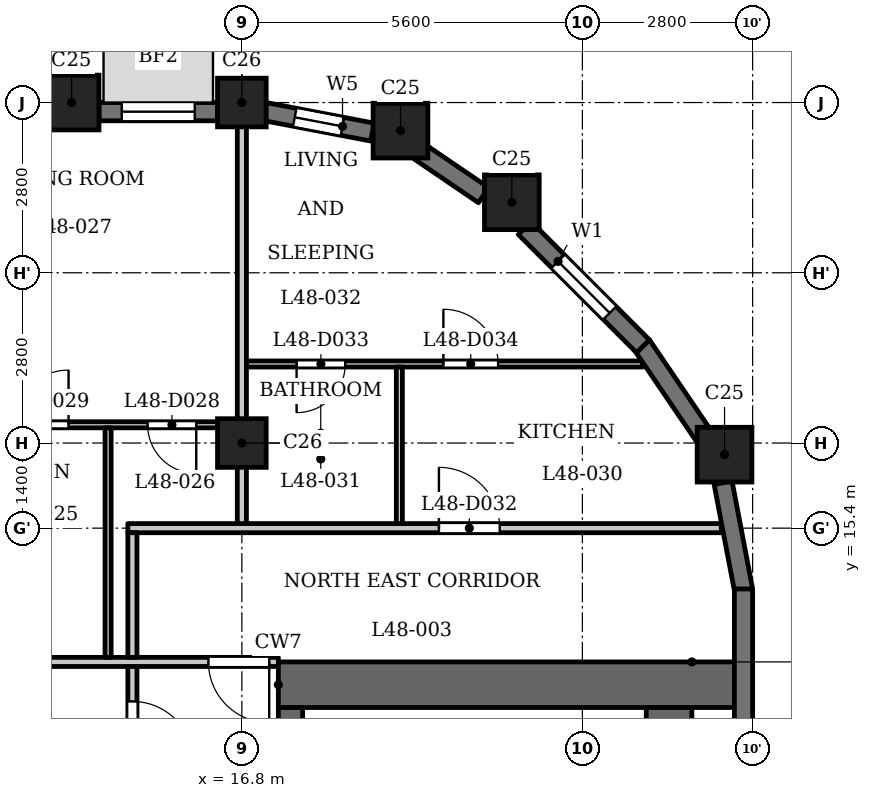
"""IFC4 building model, lengths in metres.
Left out: names, types, materials, properties, quantities, classifications, styles, units other than length and angle.
Written with IfcOpenShell. Run it as: python <this file> out.ifc"""

import sys

from ifc_helpers import new_model, si_unit, direction, frame, frame_2d, origin, origin_2d, place, context, subcontext, project, spatial, rectangle, extrude, element, fill, save


model = new_model("IFC4")
c1 = context("Model", 3, precision=1e-05, world=origin(), true_north=direction((0.0, 1.0)))
c2 = subcontext(c1, "Body", "Model", "MODEL_VIEW")
j1 = project(units=[si_unit("LENGTHUNIT", "METRE"), si_unit("PLANEANGLEUNIT", "RADIAN")], contexts=[c1])
p1 = place(None, origin())
s1 = spatial("IfcSite", under=j1, at=p1, CompositionType="ELEMENT")
p2 = place(p1, origin())
s2 = spatial("IfcBuilding", under=s1, at=p2, CompositionType="ELEMENT")
p3 = place(p2, frame((0.0, 0.0, 188.9)))
s3 = spatial("IfcBuildingStorey", under=s2, at=p3, CompositionType="ELEMENT", Elevation=188.9)
for number, where, z_axis, x_axis in (
    (1, (24.738, 16.609, 0.0), (0.0, 0.0, 1.0), (1.0, 0.0, 0.0)),
    (2, (21.24, 20.76, 0.0), (0.0, 0.0, 1.0), (1.0, 0.0, 0.0)),
    (3, (19.409, 21.938, 0.0), (0.0, 0.0, 1.0), (1.0, 0.0, 0.0)),
    (4, (14.0, 22.4, 0.0), (0.0, 0.0, 1.0), (1.0, 0.0, 0.0)),
):
    element("IfcColumn", number, at=place(p3, frame(where, z_axis=z_axis, x_axis=x_axis)), inside=s3, PredefinedType="COLUMN", context=c2, shape_type="SweptSolid", body=[
        extrude(rectangle(XDim=0.9, YDim=0.9, at=origin_2d()), origin(), (0.0, 0.0, 1.0), 3.5),
    ])
for number, where, z_axis, x_axis in (
    (5, (16.8, 16.8, 0.0), (0.0, 0.0, 1.0), (1.0, 0.0, 0.0)),
    (6, (16.8, 22.4, 0.0), (0.0, 0.0, 1.0), (1.0, 0.0, 0.0)),
):
    element("IfcColumn", number, at=place(p3, frame(where, z_axis=z_axis, x_axis=x_axis)), inside=s3, PredefinedType="COLUMN", context=c2, shape_type="SweptSolid", body=[
        extrude(rectangle(XDim=0.8, YDim=0.8, at=origin_2d()), origin(), (0.0, 0.0, 1.0), 3.5),
    ])
p4 = place(p3, frame((25.05, 11.65, 0.0), z_axis=(0.0, 0.0, 1.0), x_axis=(0.0, 1.0, 0.0)))
e7 = element("IfcWall", 7, at=p4, inside=s3, PredefinedType="SOLIDWALL", context=c2, shape_type="SweptSolid", body=[
    extrude(rectangle(XDim=2.75, YDim=0.3, at=frame_2d((1.375, 0.0))), origin(), (0.0, 0.0, 1.0), 2.5),
])
for number, where, z_axis, x_axis in (
    (8, (25.053, 14.372, 0.0), (0.0, 0.0, 1.0), (-0.187, 0.982, 0.0)),
    (9, (24.394, 16.919, 0.0), (0.0, 0.0, 1.0), (-0.562, 0.827, 0.0)),
):
    element("IfcWall", number, at=place(p3, frame(where, z_axis=z_axis, x_axis=x_axis)), inside=s3, PredefinedType="SOLIDWALL", context=c2, shape_type="SweptSolid", body=[
        extrude(rectangle(XDim=1.806, YDim=0.3, at=frame_2d((0.903, 0.0))), origin(), (0.0, 0.0, 1.0), 2.5),
    ])
p5 = place(p3, frame((23.397, 18.391, 0.0), z_axis=(0.0, 0.0, 1.0), x_axis=(-0.707106781187, 0.707106781187, 0.0)))
e10 = element("IfcWall", 10, at=p5, inside=s3, PredefinedType="SOLIDWALL", context=c2, shape_type="SweptSolid", body=[
    extrude(rectangle(XDim=2.75, YDim=0.3, at=frame_2d((1.375, 0.0))), origin(), (0.0, 0.0, 1.0), 2.5),
])
p6 = place(p5, frame((0.775, 0.0, 0.6)))
e11 = element("IfcOpeningElement", 11, at=p6, cuts=e10, PredefinedType="OPENING", context=c2, shape_type="SweptSolid", body=[
    extrude(rectangle(XDim=1.2, YDim=1.55, at=frame_2d((0.6, 0.775))), frame((0.0, 0.16, 0.0), z_axis=(0.0, -1.0, 0.0), x_axis=(1.0, 0.0, 0.0)), (0.0, 0.0, 1.0), 0.32),
])
p7 = place(p3, frame((20.775, 20.876, 0.0), z_axis=(0.0, 0.0, 1.0), x_axis=(-0.827075824828, 0.562090366388, 0.0)))
e12 = element("IfcWall", 12, at=p7, inside=s3, PredefinedType="SOLIDWALL", context=c2, shape_type="SweptSolid", body=[
    extrude(rectangle(XDim=1.277, YDim=0.3, at=frame_2d((0.638, 0.0))), origin(), (0.0, 0.0, 1.0), 2.5),
])
p8 = place(p3, frame((18.946, 21.914, 0.0), z_axis=(0.0, 0.0, 1.0), x_axis=(-0.98230529033, 0.187286722942, 0.0)))
e13 = element("IfcWall", 13, at=p8, inside=s3, PredefinedType="SOLIDWALL", context=c2, shape_type="SweptSolid", body=[
    extrude(rectangle(XDim=1.799, YDim=0.3, at=frame_2d((0.899, 0.0))), origin(), (0.0, 0.0, 1.0), 2.5),
])
p9 = place(p8, frame((0.5, 0.0, 0.6)))
e14 = element("IfcOpeningElement", 14, at=p9, cuts=e13, PredefinedType="OPENING", context=c2, shape_type="SweptSolid", body=[
    extrude(rectangle(XDim=0.8, YDim=1.55, at=frame_2d((0.4, 0.775))), frame((0.0, 0.16, 0.0), z_axis=(0.0, -1.0, 0.0), x_axis=(1.0, 0.0, 0.0)), (0.0, 0.0, 1.0), 0.32),
])
p10 = place(p3, frame((16.4, 22.25, 0.0), z_axis=(0.0, 0.0, 1.0), x_axis=(-1.0, 0.0, 0.0)))
e15 = element("IfcWall", 15, at=p10, inside=s3, PredefinedType="SOLIDWALL", context=c2, shape_type="SweptSolid", body=[
    extrude(rectangle(XDim=1.95, YDim=0.3, at=frame_2d((0.975, 0.0))), origin(), (0.0, 0.0, 1.0), 2.5),
])
p11 = place(p10, frame((0.375, 0.0, 0.6)))
e16 = element("IfcOpeningElement", 16, at=p11, cuts=e15, PredefinedType="OPENING", context=c2, shape_type="SweptSolid", body=[
    extrude(rectangle(XDim=1.2, YDim=1.55, at=frame_2d((0.6, 0.775))), frame((0.0, 0.16, 0.0), z_axis=(0.0, -1.0, 0.0), x_axis=(1.0, 0.0, 0.0)), (0.0, 0.0, 1.0), 0.32),
])
p12 = place(p3, frame((17.4, 12.825, 0.0), z_axis=(0.0, 0.0, 1.0), x_axis=(1.0, 0.0, 0.0)))
e17 = element("IfcWall", 17, at=p12, inside=s3, PredefinedType="SHEAR", context=c2, shape_type="SweptSolid", body=[
    extrude(rectangle(XDim=7.6, YDim=0.75, at=frame_2d((3.8, 0.0))), origin(), (0.0, 0.0, 1.0), 3.2),
])
p13 = place(p3, frame((17.6, -12.45, 0.0), z_axis=(0.0, 0.0, 1.0), x_axis=(0.0, 1.0, 0.0)))
e18 = element("IfcWall", 18, at=p13, inside=s3, PredefinedType="SHEAR", context=c2, shape_type="SweptSolid", body=[
    extrude(rectangle(XDim=24.9, YDim=0.4, at=frame_2d((12.45, 0.0))), origin(), (0.0, 0.0, 1.0), 3.2),
])
p14 = place(p13, frame((6.325, 0.0, 0.0)))
e19 = element("IfcOpeningElement", 19, at=p14, cuts=e18, PredefinedType="OPENING", context=c2, shape_type="SweptSolid", body=[
    extrude(rectangle(XDim=0.9, YDim=2.1, at=frame_2d((0.45, 1.05))), frame((0.0, 0.21, 0.0), z_axis=(0.0, -1.0, 0.0), x_axis=(1.0, 0.0, 0.0)), (0.0, 0.0, 1.0), 0.42),
])
p15 = place(p13, frame((9.925, 0.0, 0.0)))
e20 = element("IfcOpeningElement", 20, at=p15, cuts=e18, PredefinedType="OPENING", context=c2, shape_type="SweptSolid", body=[
    extrude(rectangle(XDim=0.9, YDim=2.1, at=frame_2d((0.45, 1.05))), frame((0.0, 0.21, 0.0), z_axis=(0.0, -1.0, 0.0), x_axis=(1.0, 0.0, 0.0)), (0.0, 0.0, 1.0), 0.42),
])
p16 = place(p13, frame((15.6, 0.0, 0.0)))
e21 = element("IfcOpeningElement", 21, at=p16, cuts=e18, PredefinedType="OPENING", context=c2, shape_type="SweptSolid", body=[
    extrude(rectangle(XDim=1.1, YDim=2.1, at=frame_2d((0.55, 1.05))), frame((0.0, 0.21, 0.0), z_axis=(0.0, -1.0, 0.0), x_axis=(1.0, 0.0, 0.0)), (0.0, 0.0, 1.0), 0.42),
])
p17 = place(p13, frame((18.0, 0.0, 0.0)))
e22 = element("IfcOpeningElement", 22, at=p17, cuts=e18, PredefinedType="OPENING", context=c2, shape_type="SweptSolid", body=[
    extrude(rectangle(XDim=1.1, YDim=2.1, at=frame_2d((0.55, 1.05))), frame((0.0, 0.21, 0.0), z_axis=(0.0, -1.0, 0.0), x_axis=(1.0, 0.0, 0.0)), (0.0, 0.0, 1.0), 0.42),
])
p18 = place(p13, frame((23.025, 0.0, 0.0)))
e23 = element("IfcOpeningElement", 23, at=p18, cuts=e18, PredefinedType="OPENING", context=c2, shape_type="SweptSolid", body=[
    extrude(rectangle(XDim=1.1, YDim=2.1, at=frame_2d((0.55, 1.05))), frame((0.0, 0.21, 0.0), z_axis=(0.0, -1.0, 0.0), x_axis=(1.0, 0.0, 0.0)), (0.0, 0.0, 1.0), 0.42),
])
p19 = place(p13, frame((0.775, 0.0, 0.0)))
e24 = element("IfcOpeningElement", 24, at=p19, cuts=e18, PredefinedType="OPENING", context=c2, shape_type="SweptSolid", body=[
    extrude(rectangle(XDim=1.1, YDim=2.1, at=frame_2d((0.55, 1.05))), frame((0.0, 0.21, 0.0), z_axis=(0.0, -1.0, 0.0), x_axis=(1.0, 0.0, 0.0)), (0.0, 0.0, 1.0), 0.42),
])
p20 = place(p13, frame((12.925, 0.0, 0.0)))
e25 = element("IfcOpeningElement", 25, at=p20, cuts=e18, PredefinedType="OPENING", context=c2, shape_type="SweptSolid", body=[
    extrude(rectangle(XDim=1.8, YDim=2.1, at=frame_2d((0.9, 1.05))), frame((0.0, 0.21, 0.0), z_axis=(0.0, -1.0, 0.0), x_axis=(1.0, 0.0, 0.0)), (0.0, 0.0, 1.0), 0.42),
])
p21 = place(p3, frame((23.825, -12.45, 0.0), z_axis=(0.0, 0.0, 1.0), x_axis=(0.0, 1.0, 0.0)))
e26 = element("IfcWall", 26, at=p21, inside=s3, PredefinedType="SHEAR", context=c2, shape_type="SweptSolid", body=[
    extrude(rectangle(XDim=24.9, YDim=0.75, at=frame_2d((12.45, 0.0))), origin(), (0.0, 0.0, 1.0), 3.2),
])
p22 = place(p3, frame((-17.4, 13.2, 0.0), z_axis=(0.0, 0.0, 1.0), x_axis=(1.0, 0.0, 0.0)))
e27 = element("IfcWall", 27, at=p22, inside=s3, PredefinedType="PARTITIONING", context=c2, shape_type="SweptSolid", body=[
    extrude(rectangle(XDim=34.8, YDim=0.15, at=frame_2d((17.4, 0.0))), origin(), (0.0, 0.0, 1.0), 3.2),
])
p23 = place(p22, frame((0.25, 0.0, 0.0)))
e28 = element("IfcOpeningElement", 28, at=p23, cuts=e27, PredefinedType="OPENING", context=c2, shape_type="SweptSolid", body=[
    extrude(rectangle(XDim=1.0, YDim=2.1, at=frame_2d((0.5, 1.05))), frame((0.0, 0.085, 0.0), z_axis=(0.0, -1.0, 0.0), x_axis=(1.0, 0.0, 0.0)), (0.0, 0.0, 1.0), 0.17),
])
p24 = place(p22, frame((33.65, 0.0, 0.0)))
e29 = element("IfcOpeningElement", 29, at=p24, cuts=e27, PredefinedType="OPENING", context=c2, shape_type="SweptSolid", body=[
    extrude(rectangle(XDim=1.0, YDim=2.1, at=frame_2d((0.5, 1.05))), frame((0.0, 0.085, 0.0), z_axis=(0.0, -1.0, 0.0), x_axis=(1.0, 0.0, 0.0)), (0.0, 0.0, 1.0), 0.17),
])
p25 = place(p22, frame((10.15, 0.0, 0.0)))
e30 = element("IfcOpeningElement", 30, at=p25, cuts=e27, PredefinedType="OPENING", context=c2, shape_type="SweptSolid", body=[
    extrude(rectangle(XDim=1.0, YDim=2.1, at=frame_2d((0.5, 1.05))), frame((0.0, 0.085, 0.0), z_axis=(0.0, -1.0, 0.0), x_axis=(1.0, 0.0, 0.0)), (0.0, 0.0, 1.0), 0.17),
])
p26 = place(p22, frame((13.55, 0.0, 0.0)))
e31 = element("IfcOpeningElement", 31, at=p26, cuts=e27, PredefinedType="OPENING", context=c2, shape_type="SweptSolid", body=[
    extrude(rectangle(XDim=1.0, YDim=2.1, at=frame_2d((0.5, 1.05))), frame((0.0, 0.085, 0.0), z_axis=(0.0, -1.0, 0.0), x_axis=(1.0, 0.0, 0.0)), (0.0, 0.0, 1.0), 0.17),
])
p27 = place(p22, frame((20.85, 0.0, 0.0)))
e32 = element("IfcOpeningElement", 32, at=p27, cuts=e27, PredefinedType="OPENING", context=c2, shape_type="SweptSolid", body=[
    extrude(rectangle(XDim=1.0, YDim=2.1, at=frame_2d((0.5, 1.05))), frame((0.0, 0.085, 0.0), z_axis=(0.0, -1.0, 0.0), x_axis=(1.0, 0.0, 0.0)), (0.0, 0.0, 1.0), 0.17),
])
p28 = place(p22, frame((23.7, 0.0, 0.0)))
e33 = element("IfcOpeningElement", 33, at=p28, cuts=e27, PredefinedType="OPENING", context=c2, shape_type="SweptSolid", body=[
    extrude(rectangle(XDim=1.0, YDim=2.1, at=frame_2d((0.5, 1.05))), frame((0.0, 0.085, 0.0), z_axis=(0.0, -1.0, 0.0), x_axis=(1.0, 0.0, 0.0)), (0.0, 0.0, 1.0), 0.17),
])
p29 = place(p3, frame((14.925, 15.4, 0.0), z_axis=(0.0, 0.0, 1.0), x_axis=(1.0, 0.0, 0.0)))
e34 = element("IfcWall", 34, at=p29, inside=s3, PredefinedType="PARTITIONING", context=c2, shape_type="SweptSolid", body=[
    extrude(rectangle(XDim=9.759, YDim=0.15, at=frame_2d((4.879, 0.0))), origin(), (0.0, 0.0, 1.0), 3.2),
])
p30 = place(p29, frame((5.116, 0.0, 0.0)))
e35 = element("IfcOpeningElement", 35, at=p30, cuts=e34, PredefinedType="OPENING", context=c2, shape_type="SweptSolid", body=[
    extrude(rectangle(XDim=1.0, YDim=2.1, at=frame_2d((0.5, 1.05))), frame((0.0, 0.085, 0.0), z_axis=(0.0, -1.0, 0.0), x_axis=(1.0, 0.0, 0.0)), (0.0, 0.0, 1.0), 0.17),
])
p31 = place(p3, frame((-16.725, 17.1, 0.0), z_axis=(0.0, 0.0, 1.0), x_axis=(1.0, 0.0, 0.0)))
e36 = element("IfcWall", 36, at=p31, inside=s3, PredefinedType="PARTITIONING", context=c2, shape_type="SweptSolid", body=[
    extrude(rectangle(XDim=33.45, YDim=0.1, at=frame_2d((16.725, 0.0))), origin(), (0.0, 0.0, 1.0), 3.2),
])
p32 = place(p31, frame((4.075, 0.0, 0.0)))
e37 = element("IfcOpeningElement", 37, at=p32, cuts=e36, PredefinedType="OPENING", context=c2, shape_type="SweptSolid", body=[
    extrude(rectangle(XDim=0.8, YDim=2.1, at=frame_2d((0.4, 1.05))), frame((0.0, 0.06, 0.0), z_axis=(0.0, -1.0, 0.0), x_axis=(1.0, 0.0, 0.0)), (0.0, 0.0, 1.0), 0.12),
])
p33 = place(p31, frame((9.575, 0.0, 0.0)))
e38 = element("IfcOpeningElement", 38, at=p33, cuts=e36, PredefinedType="OPENING", context=c2, shape_type="SweptSolid", body=[
    extrude(rectangle(XDim=0.9, YDim=2.1, at=frame_2d((0.45, 1.05))), frame((0.0, 0.06, 0.0), z_axis=(0.0, -1.0, 0.0), x_axis=(1.0, 0.0, 0.0)), (0.0, 0.0, 1.0), 0.12),
])
p34 = place(p31, frame((15.175, 0.0, 0.0)))
e39 = element("IfcOpeningElement", 39, at=p34, cuts=e36, PredefinedType="OPENING", context=c2, shape_type="SweptSolid", body=[
    extrude(rectangle(XDim=0.8, YDim=2.1, at=frame_2d((0.4, 1.05))), frame((0.0, 0.06, 0.0), z_axis=(0.0, -1.0, 0.0), x_axis=(1.0, 0.0, 0.0)), (0.0, 0.0, 1.0), 0.12),
])
p35 = place(p31, frame((12.975, 0.0, 0.0)))
e40 = element("IfcOpeningElement", 40, at=p35, cuts=e36, PredefinedType="OPENING", context=c2, shape_type="SweptSolid", body=[
    extrude(rectangle(XDim=0.9, YDim=2.1, at=frame_2d((0.45, 1.05))), frame((0.0, 0.06, 0.0), z_axis=(0.0, -1.0, 0.0), x_axis=(1.0, 0.0, 0.0)), (0.0, 0.0, 1.0), 0.12),
])
p36 = place(p31, frame((17.625, 0.0, 0.0)))
e41 = element("IfcOpeningElement", 41, at=p36, cuts=e36, PredefinedType="OPENING", context=c2, shape_type="SweptSolid", body=[
    extrude(rectangle(XDim=0.8, YDim=2.1, at=frame_2d((0.4, 1.05))), frame((0.0, 0.06, 0.0), z_axis=(0.0, -1.0, 0.0), x_axis=(1.0, 0.0, 0.0)), (0.0, 0.0, 1.0), 0.12),
])
p37 = place(p31, frame((20.025, 0.0, 0.0)))
e42 = element("IfcOpeningElement", 42, at=p37, cuts=e36, PredefinedType="OPENING", context=c2, shape_type="SweptSolid", body=[
    extrude(rectangle(XDim=0.9, YDim=2.1, at=frame_2d((0.45, 1.05))), frame((0.0, 0.06, 0.0), z_axis=(0.0, -1.0, 0.0), x_axis=(1.0, 0.0, 0.0)), (0.0, 0.0, 1.0), 0.12),
])
p38 = place(p31, frame((31.975, 0.0, 0.0)))
e43 = element("IfcOpeningElement", 43, at=p38, cuts=e36, PredefinedType="OPENING", context=c2, shape_type="SweptSolid", body=[
    extrude(rectangle(XDim=0.8, YDim=2.1, at=frame_2d((0.4, 1.05))), frame((0.0, 0.06, 0.0), z_axis=(0.0, -1.0, 0.0), x_axis=(1.0, 0.0, 0.0)), (0.0, 0.0, 1.0), 0.12),
])
p39 = place(p31, frame((29.775, 0.0, 0.0)))
e44 = element("IfcOpeningElement", 44, at=p39, cuts=e36, PredefinedType="OPENING", context=c2, shape_type="SweptSolid", body=[
    extrude(rectangle(XDim=0.9, YDim=2.1, at=frame_2d((0.45, 1.05))), frame((0.0, 0.06, 0.0), z_axis=(0.0, -1.0, 0.0), x_axis=(1.0, 0.0, 0.0)), (0.0, 0.0, 1.0), 0.12),
])
p40 = place(p31, frame((23.025, 0.0, 0.0)))
e45 = element("IfcOpeningElement", 45, at=p40, cuts=e36, PredefinedType="OPENING", context=c2, shape_type="SweptSolid", body=[
    extrude(rectangle(XDim=0.9, YDim=2.1, at=frame_2d((0.45, 1.05))), frame((0.0, 0.06, 0.0), z_axis=(0.0, -1.0, 0.0), x_axis=(1.0, 0.0, 0.0)), (0.0, 0.0, 1.0), 0.12),
])
p41 = place(p31, frame((26.125, 0.0, 0.0)))
e46 = element("IfcOpeningElement", 46, at=p41, cuts=e36, PredefinedType="OPENING", context=c2, shape_type="SweptSolid", body=[
    extrude(rectangle(XDim=0.9, YDim=2.1, at=frame_2d((0.45, 1.05))), frame((0.0, 0.06, 0.0), z_axis=(0.0, -1.0, 0.0), x_axis=(1.0, 0.0, 0.0)), (0.0, 0.0, 1.0), 0.12),
])
p42 = place(p3, frame((16.875, 18.1, 0.0), z_axis=(0.0, 0.0, 1.0), x_axis=(1.0, 0.0, 0.0)))
e47 = element("IfcWall", 47, at=p42, inside=s3, PredefinedType="PARTITIONING", context=c2, shape_type="SweptSolid", body=[
    extrude(rectangle(XDim=6.515, YDim=0.1, at=frame_2d((3.258, 0.0))), origin(), (0.0, 0.0, 1.0), 3.2),
])
p43 = place(p42, frame((0.825, 0.0, 0.0)))
e48 = element("IfcOpeningElement", 48, at=p43, cuts=e47, PredefinedType="OPENING", context=c2, shape_type="SweptSolid", body=[
    extrude(rectangle(XDim=0.8, YDim=2.1, at=frame_2d((0.4, 1.05))), frame((0.0, 0.06, 0.0), z_axis=(0.0, -1.0, 0.0), x_axis=(1.0, 0.0, 0.0)), (0.0, 0.0, 1.0), 0.12),
])
p44 = place(p42, frame((3.239, 0.0, 0.0)))
e49 = element("IfcOpeningElement", 49, at=p44, cuts=e47, PredefinedType="OPENING", context=c2, shape_type="SweptSolid", body=[
    extrude(rectangle(XDim=0.9, YDim=2.1, at=frame_2d((0.45, 1.05))), frame((0.0, 0.06, 0.0), z_axis=(0.0, -1.0, 0.0), x_axis=(1.0, 0.0, 0.0)), (0.0, 0.0, 1.0), 0.12),
])
p45 = place(p3, frame((14.6, 13.275, 0.0), z_axis=(0.0, 0.0, 1.0), x_axis=(0.0, 1.0, 0.0)))
e50 = element("IfcWall", 50, at=p45, inside=s3, PredefinedType="PARTITIONING", context=c2, shape_type="SweptSolid", body=[
    extrude(rectangle(XDim=3.775, YDim=0.1, at=frame_2d((1.888, 0.0))), origin(), (0.0, 0.0, 1.0), 3.2),
])
p46 = place(p3, frame((15.0, 6.769, 0.0), z_axis=(0.0, 0.0, 1.0), x_axis=(0.0, 1.0, 0.0)))
e51 = element("IfcWall", 51, at=p46, inside=s3, PredefinedType="PARTITIONING", context=c2, shape_type="SweptSolid", body=[
    extrude(rectangle(XDim=6.356, YDim=0.15, at=frame_2d((3.178, 0.0))), origin(), (0.0, 0.0, 1.0), 3.2),
])
p47 = place(p46, frame((4.781, 0.0, 0.0)))
e52 = element("IfcOpeningElement", 52, at=p47, cuts=e51, PredefinedType="OPENING", context=c2, shape_type="SweptSolid", body=[
    extrude(rectangle(XDim=1.0, YDim=2.1, at=frame_2d((0.5, 1.05))), frame((0.0, 0.085, 0.0), z_axis=(0.0, -1.0, 0.0), x_axis=(1.0, 0.0, 0.0)), (0.0, 0.0, 1.0), 0.17),
])
p48 = place(p3, frame((15.0, 13.275, 0.0), z_axis=(0.0, 0.0, 1.0), x_axis=(0.0, 1.0, 0.0)))
e53 = element("IfcWall", 53, at=p48, inside=s3, PredefinedType="PARTITIONING", context=c2, shape_type="SweptSolid", body=[
    extrude(rectangle(XDim=2.05, YDim=0.15, at=frame_2d((1.025, 0.0))), origin(), (0.0, 0.0, 1.0), 3.2),
])
p49 = place(p3, frame((16.8, 15.475, 0.0), z_axis=(0.0, 0.0, 1.0), x_axis=(0.0, 1.0, 0.0)))
e54 = element("IfcWall", 54, at=p49, inside=s3, PredefinedType="PARTITIONING", context=c2, shape_type="SweptSolid", body=[
    extrude(rectangle(XDim=6.835, YDim=0.15, at=frame_2d((3.417, 0.0))), origin(), (0.0, 0.0, 1.0), 2.55),
])
p50 = place(p3, frame((19.39, 15.475, 0.0), z_axis=(0.0, 0.0, 1.0), x_axis=(0.0, 1.0, 0.0)))
e55 = element("IfcWall", 55, at=p50, inside=s3, PredefinedType="PARTITIONING", context=c2, shape_type="SweptSolid", body=[
    extrude(rectangle(XDim=2.575, YDim=0.1, at=frame_2d((1.288, 0.0))), origin(), (0.0, 0.0, 1.0), 3.2),
])
p51 = place(p47, origin())
e56 = element("IfcDoor", 56, at=p51, inside=s3, OperationType="SINGLE_SWING_LEFT", PredefinedType="DOOR", context=c2, shape_type="SweptSolid", body=[
    extrude(rectangle(XDim=1.0, YDim=2.1, at=frame_2d((0.5, 1.05))), frame((0.0, 0.025, 0.0), z_axis=(0.0, -1.0, 0.0), x_axis=(1.0, 0.0, 0.0)), (0.0, 0.0, 1.0), 0.05),
])
fill(e52, e56)
p52 = place(p24, origin())
e57 = element("IfcDoor", 57, at=p52, inside=s3, OperationType="SINGLE_SWING_RIGHT", PredefinedType="DOOR", context=c2, shape_type="SweptSolid", body=[
    extrude(rectangle(XDim=1.0, YDim=2.1, at=frame_2d((0.5, 1.05))), frame((0.0, 0.025, 0.0), z_axis=(0.0, -1.0, 0.0), x_axis=(1.0, 0.0, 0.0)), (0.0, 0.0, 1.0), 0.05),
])
fill(e29, e57)
p53 = place(p38, origin())
e58 = element("IfcDoor", 58, at=p53, inside=s3, OperationType="SINGLE_SWING_RIGHT", PredefinedType="DOOR", context=c2, shape_type="SweptSolid", body=[
    extrude(rectangle(XDim=0.8, YDim=2.1, at=frame_2d((0.4, 1.05))), frame((0.0, 0.025, 0.0), z_axis=(0.0, -1.0, 0.0), x_axis=(1.0, 0.0, 0.0)), (0.0, 0.0, 1.0), 0.05),
])
fill(e43, e58)
p54 = place(p39, origin())
e59 = element("IfcDoor", 59, at=p54, inside=s3, OperationType="SINGLE_SWING_LEFT", PredefinedType="DOOR", context=c2, shape_type="SweptSolid", body=[
    extrude(rectangle(XDim=0.9, YDim=2.1, at=frame_2d((0.45, 1.05))), frame((0.0, 0.025, 0.0), z_axis=(0.0, -1.0, 0.0), x_axis=(1.0, 0.0, 0.0)), (0.0, 0.0, 1.0), 0.05),
])
fill(e44, e59)
p55 = place(p30, origin())
e60 = element("IfcDoor", 60, at=p55, inside=s3, OperationType="SINGLE_SWING_RIGHT", PredefinedType="DOOR", context=c2, shape_type="SweptSolid", body=[
    extrude(rectangle(XDim=1.0, YDim=2.1, at=frame_2d((0.5, 1.05))), frame((0.0, 0.025, 0.0), z_axis=(0.0, -1.0, 0.0), x_axis=(1.0, 0.0, 0.0)), (0.0, 0.0, 1.0), 0.05),
])
fill(e35, e60)
p56 = place(p43, origin())
e61 = element("IfcDoor", 61, at=p56, inside=s3, OperationType="SINGLE_SWING_LEFT", PredefinedType="DOOR", context=c2, shape_type="SweptSolid", body=[
    extrude(rectangle(XDim=0.8, YDim=2.1, at=frame_2d((0.4, 1.05))), frame((0.0, 0.025, 0.0), z_axis=(0.0, -1.0, 0.0), x_axis=(1.0, 0.0, 0.0)), (0.0, 0.0, 1.0), 0.05),
])
fill(e48, e61)
p57 = place(p44, origin())
e62 = element("IfcDoor", 62, at=p57, inside=s3, OperationType="SINGLE_SWING_RIGHT", PredefinedType="DOOR", context=c2, shape_type="SweptSolid", body=[
    extrude(rectangle(XDim=0.9, YDim=2.1, at=frame_2d((0.45, 1.05))), frame((0.0, 0.025, 0.0), z_axis=(0.0, -1.0, 0.0), x_axis=(1.0, 0.0, 0.0)), (0.0, 0.0, 1.0), 0.05),
])
fill(e49, e62)
p58 = place(p6, origin())
e63 = element("IfcWindow", 63, at=p58, inside=s3, PartitioningType="SINGLE_PANEL", PredefinedType="WINDOW", context=c2, shape_type="SweptSolid", body=[
    extrude(rectangle(XDim=1.2, YDim=1.55, at=frame_2d((0.6, 0.775))), frame((0.0, 0.03, 0.0), z_axis=(0.0, -1.0, 0.0), x_axis=(1.0, 0.0, 0.0)), (0.0, 0.0, 1.0), 0.06),
])
fill(e11, e63)
p59 = place(p9, origin())
e64 = element("IfcWindow", 64, at=p59, inside=s3, PartitioningType="SINGLE_PANEL", PredefinedType="WINDOW", context=c2, shape_type="SweptSolid", body=[
    extrude(rectangle(XDim=0.8, YDim=1.55, at=frame_2d((0.4, 0.775))), frame((0.0, 0.03, 0.0), z_axis=(0.0, -1.0, 0.0), x_axis=(1.0, 0.0, 0.0)), (0.0, 0.0, 1.0), 0.06),
])
fill(e14, e64)
p60 = place(p11, origin())
e65 = element("IfcWindow", 65, at=p60, inside=s3, PartitioningType="SINGLE_PANEL", PredefinedType="WINDOW", context=c2, shape_type="SweptSolid", body=[
    extrude(rectangle(XDim=1.2, YDim=1.55, at=frame_2d((0.6, 0.775))), frame((0.0, 0.03, 0.0), z_axis=(0.0, -1.0, 0.0), x_axis=(1.0, 0.0, 0.0)), (0.0, 0.0, 1.0), 0.06),
])
fill(e16, e65)
save(model, sys.argv[1])
